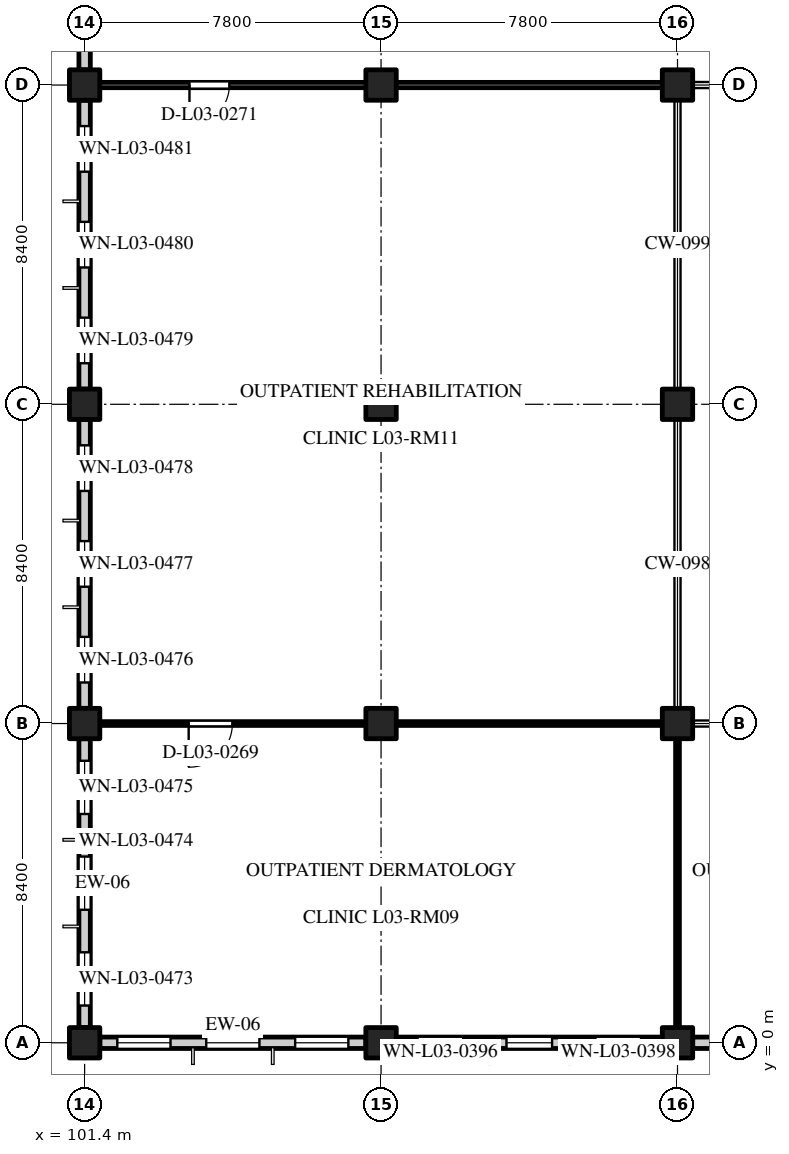
"""IFC4 building model, lengths in metres.
Left out: names, types, materials, properties, quantities, classifications, styles, units other than length and angle.
Written with IfcOpenShell. Run it as: python <this file> out.ifc"""

import sys

from ifc_helpers import new_model, si_unit, direction, frame, frame_2d, origin, origin_2d, place, context, subcontext, project, spatial, rectangle, extrude, element, fill, save


model = new_model("IFC4")
c1 = context("Model", 3, precision=1e-05, world=origin(), true_north=direction((0.0, 1.0)))
c2 = subcontext(c1, "Body", "Model", "MODEL_VIEW")
j1 = project(units=[si_unit("LENGTHUNIT", "METRE"), si_unit("PLANEANGLEUNIT", "RADIAN")], contexts=[c1])
p1 = place(None, origin())
s1 = spatial("IfcSite", under=j1, at=p1, CompositionType="ELEMENT")
p2 = place(p1, origin())
s2 = spatial("IfcBuilding", under=s1, at=p2, CompositionType="ELEMENT")
p3 = place(p2, frame((0.0, 0.0, 14.4)))
s3 = spatial("IfcBuildingStorey", under=s2, at=p3, CompositionType="ELEMENT", Elevation=14.4)
for number, where, z_axis, x_axis in (
    (1, (101.4, 0.0, 0.0), (0.0, 0.0, 1.0), (1.0, 0.0, 0.0)),
    (2, (101.4, 8.4, 0.0), (0.0, 0.0, 1.0), (1.0, 0.0, 0.0)),
    (3, (101.4, 16.8, 0.0), (0.0, 0.0, 1.0), (1.0, 0.0, 0.0)),
    (4, (101.4, 25.2, 0.0), (0.0, 0.0, 1.0), (1.0, 0.0, 0.0)),
    (5, (109.2, 0.0, 0.0), (0.0, 0.0, 1.0), (1.0, 0.0, 0.0)),
    (6, (109.2, 8.4, 0.0), (0.0, 0.0, 1.0), (1.0, 0.0, 0.0)),
    (7, (109.2, 16.8, 0.0), (0.0, 0.0, 1.0), (1.0, 0.0, 0.0)),
    (8, (109.2, 25.2, 0.0), (0.0, 0.0, 1.0), (1.0, 0.0, 0.0)),
    (9, (117.0, 0.0, 0.0), (0.0, 0.0, 1.0), (1.0, 0.0, 0.0)),
    (10, (117.0, 8.4, 0.0), (0.0, 0.0, 1.0), (1.0, 0.0, 0.0)),
    (11, (117.0, 16.8, 0.0), (0.0, 0.0, 1.0), (1.0, 0.0, 0.0)),
    (12, (117.0, 25.2, 0.0), (0.0, 0.0, 1.0), (1.0, 0.0, 0.0)),
):
    element("IfcColumn", number, at=place(p3, frame(where, z_axis=z_axis, x_axis=x_axis)), inside=s3, PredefinedType="COLUMN", context=c2, shape_type="SweptSolid", body=[
        extrude(rectangle(XDim=0.8, YDim=0.8, at=origin_2d()), origin(), (0.0, 0.0, 1.0), 3.6),
    ])
p4 = place(p3, frame((101.8, 0.0, 0.0), z_axis=(0.0, 0.0, 1.0), x_axis=(1.0, 0.0, 0.0)))
e13 = element("IfcWall", 13, at=p4, inside=s3, PredefinedType="STANDARD", context=c2, shape_type="SweptSolid", body=[
    extrude(rectangle(XDim=7.0, YDim=0.3, at=frame_2d((3.5, 0.0))), origin(), (0.0, 0.0, 1.0), 2.72),
])
p5 = place(p4, frame((0.46, 0.0, 0.8)))
e14 = element("IfcOpeningElement", 14, at=p5, cuts=e13, PredefinedType="OPENING", context=c2, shape_type="SweptSolid", body=[
    extrude(rectangle(XDim=1.4, YDim=1.45, at=frame_2d((0.7, 0.725))), frame((0.0, 0.162, 0.0), z_axis=(0.0, -1.0, 0.0), x_axis=(1.0, 0.0, 0.0)), (0.0, 0.0, 1.0), 0.324),
])
p6 = place(p4, frame((2.8, 0.0, 0.8)))
e15 = element("IfcOpeningElement", 15, at=p6, cuts=e13, PredefinedType="OPENING", context=c2, shape_type="SweptSolid", body=[
    extrude(rectangle(XDim=1.4, YDim=1.45, at=frame_2d((0.7, 0.725))), frame((0.0, 0.162, 0.0), z_axis=(0.0, -1.0, 0.0), x_axis=(1.0, 0.0, 0.0)), (0.0, 0.0, 1.0), 0.324),
])
p7 = place(p4, frame((5.14, 0.0, 0.8)))
e16 = element("IfcOpeningElement", 16, at=p7, cuts=e13, PredefinedType="OPENING", context=c2, shape_type="SweptSolid", body=[
    extrude(rectangle(XDim=1.4, YDim=1.45, at=frame_2d((0.7, 0.725))), frame((0.0, 0.162, 0.0), z_axis=(0.0, -1.0, 0.0), x_axis=(1.0, 0.0, 0.0)), (0.0, 0.0, 1.0), 0.324),
])
p8 = place(p3, frame((109.6, 0.0, 0.0), z_axis=(0.0, 0.0, 1.0), x_axis=(1.0, 0.0, 0.0)))
e17 = element("IfcWall", 17, at=p8, inside=s3, PredefinedType="STANDARD", context=c2, shape_type="SweptSolid", body=[
    extrude(rectangle(XDim=7.0, YDim=0.3, at=frame_2d((3.5, 0.0))), origin(), (0.0, 0.0, 1.0), 2.72),
])
p9 = place(p8, frame((0.56, 0.0, 0.8)))
e18 = element("IfcOpeningElement", 18, at=p9, cuts=e17, PredefinedType="OPENING", context=c2, shape_type="SweptSolid", body=[
    extrude(rectangle(XDim=1.2, YDim=1.55, at=frame_2d((0.6, 0.775))), frame((0.0, 0.162, 0.0), z_axis=(0.0, -1.0, 0.0), x_axis=(1.0, 0.0, 0.0)), (0.0, 0.0, 1.0), 0.324),
])
p10 = place(p8, frame((2.9, 0.0, 0.8)))
e19 = element("IfcOpeningElement", 19, at=p10, cuts=e17, PredefinedType="OPENING", context=c2, shape_type="SweptSolid", body=[
    extrude(rectangle(XDim=1.2, YDim=1.55, at=frame_2d((0.6, 0.775))), frame((0.0, 0.162, 0.0), z_axis=(0.0, -1.0, 0.0), x_axis=(1.0, 0.0, 0.0)), (0.0, 0.0, 1.0), 0.324),
])
p11 = place(p8, frame((5.24, 0.0, 0.8)))
e20 = element("IfcOpeningElement", 20, at=p11, cuts=e17, PredefinedType="OPENING", context=c2, shape_type="SweptSolid", body=[
    extrude(rectangle(XDim=1.2, YDim=1.55, at=frame_2d((0.6, 0.775))), frame((0.0, 0.162, 0.0), z_axis=(0.0, -1.0, 0.0), x_axis=(1.0, 0.0, 0.0)), (0.0, 0.0, 1.0), 0.324),
])
p12 = place(p3, frame((117.4, 0.0, 0.0), z_axis=(0.0, 0.0, 1.0), x_axis=(1.0, 0.0, 0.0)))
e21 = element("IfcWall", 21, at=p12, inside=s3, PredefinedType="STANDARD", context=c2, shape_type="SweptSolid", body=[
    extrude(rectangle(XDim=7.0, YDim=0.3, at=frame_2d((3.5, 0.0))), origin(), (0.0, 0.0, 1.0), 2.72),
])
p13 = place(p12, frame((0.56, 0.0, 0.8)))
e22 = element("IfcOpeningElement", 22, at=p13, cuts=e21, PredefinedType="OPENING", context=c2, shape_type="SweptSolid", body=[
    extrude(rectangle(XDim=1.2, YDim=1.4, at=frame_2d((0.6, 0.7))), frame((0.0, 0.162, 0.0), z_axis=(0.0, -1.0, 0.0), x_axis=(1.0, 0.0, 0.0)), (0.0, 0.0, 1.0), 0.324),
])
p14 = place(p12, frame((2.9, 0.0, 0.8)))
e23 = element("IfcOpeningElement", 23, at=p14, cuts=e21, PredefinedType="OPENING", context=c2, shape_type="SweptSolid", body=[
    extrude(rectangle(XDim=1.2, YDim=1.4, at=frame_2d((0.6, 0.7))), frame((0.0, 0.162, 0.0), z_axis=(0.0, -1.0, 0.0), x_axis=(1.0, 0.0, 0.0)), (0.0, 0.0, 1.0), 0.324),
])
p15 = place(p12, frame((5.24, 0.0, 0.8)))
e24 = element("IfcOpeningElement", 24, at=p15, cuts=e21, PredefinedType="OPENING", context=c2, shape_type="SweptSolid", body=[
    extrude(rectangle(XDim=1.2, YDim=1.4, at=frame_2d((0.6, 0.7))), frame((0.0, 0.162, 0.0), z_axis=(0.0, -1.0, 0.0), x_axis=(1.0, 0.0, 0.0)), (0.0, 0.0, 1.0), 0.324),
])
p16 = place(p3, frame((101.4, 0.4, 0.0), z_axis=(0.0, 0.0, 1.0), x_axis=(0.0, 1.0, 0.0)))
e25 = element("IfcWall", 25, at=p16, inside=s3, PredefinedType="STANDARD", context=c2, shape_type="SweptSolid", body=[
    extrude(rectangle(XDim=7.6, YDim=0.3, at=frame_2d((3.8, 0.0))), origin(), (0.0, 0.0, 1.0), 2.62),
])
p17 = place(p16, frame((0.58, 0.0, 0.8)))
e26 = element("IfcOpeningElement", 26, at=p17, cuts=e25, PredefinedType="OPENING", context=c2, shape_type="SweptSolid", body=[
    extrude(rectangle(XDim=1.4, YDim=1.45, at=frame_2d((0.7, 0.725))), frame((0.0, 0.162, 0.0), z_axis=(0.0, -1.0, 0.0), x_axis=(1.0, 0.0, 0.0)), (0.0, 0.0, 1.0), 0.324),
])
p18 = place(p16, frame((3.1, 0.0, 0.8)))
e27 = element("IfcOpeningElement", 27, at=p18, cuts=e25, PredefinedType="OPENING", context=c2, shape_type="SweptSolid", body=[
    extrude(rectangle(XDim=1.4, YDim=1.45, at=frame_2d((0.7, 0.725))), frame((0.0, 0.162, 0.0), z_axis=(0.0, -1.0, 0.0), x_axis=(1.0, 0.0, 0.0)), (0.0, 0.0, 1.0), 0.324),
])
p19 = place(p16, frame((5.62, 0.0, 0.8)))
e28 = element("IfcOpeningElement", 28, at=p19, cuts=e25, PredefinedType="OPENING", context=c2, shape_type="SweptSolid", body=[
    extrude(rectangle(XDim=1.4, YDim=1.45, at=frame_2d((0.7, 0.725))), frame((0.0, 0.162, 0.0), z_axis=(0.0, -1.0, 0.0), x_axis=(1.0, 0.0, 0.0)), (0.0, 0.0, 1.0), 0.324),
])
p20 = place(p3, frame((101.4, 8.8, 0.0), z_axis=(0.0, 0.0, 1.0), x_axis=(0.0, 1.0, 0.0)))
e29 = element("IfcWall", 29, at=p20, inside=s3, PredefinedType="STANDARD", context=c2, shape_type="SweptSolid", body=[
    extrude(rectangle(XDim=7.6, YDim=0.3, at=frame_2d((3.8, 0.0))), origin(), (0.0, 0.0, 1.0), 2.62),
])
p21 = place(p20, frame((0.68, 0.0, 0.8)))
e30 = element("IfcOpeningElement", 30, at=p21, cuts=e29, PredefinedType="OPENING", context=c2, shape_type="SweptSolid", body=[
    extrude(rectangle(XDim=1.2, YDim=1.55, at=frame_2d((0.6, 0.775))), frame((0.0, 0.162, 0.0), z_axis=(0.0, -1.0, 0.0), x_axis=(1.0, 0.0, 0.0)), (0.0, 0.0, 1.0), 0.324),
])
p22 = place(p20, frame((3.2, 0.0, 0.8)))
e31 = element("IfcOpeningElement", 31, at=p22, cuts=e29, PredefinedType="OPENING", context=c2, shape_type="SweptSolid", body=[
    extrude(rectangle(XDim=1.2, YDim=1.55, at=frame_2d((0.6, 0.775))), frame((0.0, 0.162, 0.0), z_axis=(0.0, -1.0, 0.0), x_axis=(1.0, 0.0, 0.0)), (0.0, 0.0, 1.0), 0.324),
])
p23 = place(p20, frame((5.72, 0.0, 0.8)))
e32 = element("IfcOpeningElement", 32, at=p23, cuts=e29, PredefinedType="OPENING", context=c2, shape_type="SweptSolid", body=[
    extrude(rectangle(XDim=1.2, YDim=1.55, at=frame_2d((0.6, 0.775))), frame((0.0, 0.162, 0.0), z_axis=(0.0, -1.0, 0.0), x_axis=(1.0, 0.0, 0.0)), (0.0, 0.0, 1.0), 0.324),
])
p24 = place(p3, frame((101.4, 17.2, 0.0), z_axis=(0.0, 0.0, 1.0), x_axis=(0.0, 1.0, 0.0)))
e33 = element("IfcWall", 33, at=p24, inside=s3, PredefinedType="STANDARD", context=c2, shape_type="SweptSolid", body=[
    extrude(rectangle(XDim=7.6, YDim=0.3, at=frame_2d((3.8, 0.0))), origin(), (0.0, 0.0, 1.0), 2.62),
])
p25 = place(p24, frame((0.68, 0.0, 0.8)))
e34 = element("IfcOpeningElement", 34, at=p25, cuts=e33, PredefinedType="OPENING", context=c2, shape_type="SweptSolid", body=[
    extrude(rectangle(XDim=1.2, YDim=1.4, at=frame_2d((0.6, 0.7))), frame((0.0, 0.162, 0.0), z_axis=(0.0, -1.0, 0.0), x_axis=(1.0, 0.0, 0.0)), (0.0, 0.0, 1.0), 0.324),
])
p26 = place(p24, frame((3.2, 0.0, 0.8)))
e35 = element("IfcOpeningElement", 35, at=p26, cuts=e33, PredefinedType="OPENING", context=c2, shape_type="SweptSolid", body=[
    extrude(rectangle(XDim=1.2, YDim=1.4, at=frame_2d((0.6, 0.7))), frame((0.0, 0.162, 0.0), z_axis=(0.0, -1.0, 0.0), x_axis=(1.0, 0.0, 0.0)), (0.0, 0.0, 1.0), 0.324),
])
p27 = place(p24, frame((5.72, 0.0, 0.8)))
e36 = element("IfcOpeningElement", 36, at=p27, cuts=e33, PredefinedType="OPENING", context=c2, shape_type="SweptSolid", body=[
    extrude(rectangle(XDim=1.2, YDim=1.4, at=frame_2d((0.6, 0.7))), frame((0.0, 0.162, 0.0), z_axis=(0.0, -1.0, 0.0), x_axis=(1.0, 0.0, 0.0)), (0.0, 0.0, 1.0), 0.324),
])
p28 = place(p3, frame((101.4, 25.6, 0.0), z_axis=(0.0, 0.0, 1.0), x_axis=(0.0, 1.0, 0.0)))
e37 = element("IfcWall", 37, at=p28, inside=s3, PredefinedType="STANDARD", context=c2, shape_type="SweptSolid", body=[
    extrude(rectangle(XDim=7.6, YDim=0.3, at=frame_2d((3.8, 0.0))), origin(), (0.0, 0.0, 1.0), 2.62),
])
p29 = place(p28, frame((0.58, 0.0, 0.8)))
e38 = element("IfcOpeningElement", 38, at=p29, cuts=e37, PredefinedType="OPENING", context=c2, shape_type="SweptSolid", body=[
    extrude(rectangle(XDim=1.4, YDim=1.6, at=frame_2d((0.7, 0.8))), frame((0.0, 0.162, 0.0), z_axis=(0.0, -1.0, 0.0), x_axis=(1.0, 0.0, 0.0)), (0.0, 0.0, 1.0), 0.324),
])
p30 = place(p28, frame((3.1, 0.0, 0.8)))
e39 = element("IfcOpeningElement", 39, at=p30, cuts=e37, PredefinedType="OPENING", context=c2, shape_type="SweptSolid", body=[
    extrude(rectangle(XDim=1.4, YDim=1.6, at=frame_2d((0.7, 0.8))), frame((0.0, 0.162, 0.0), z_axis=(0.0, -1.0, 0.0), x_axis=(1.0, 0.0, 0.0)), (0.0, 0.0, 1.0), 0.324),
])
p31 = place(p28, frame((5.62, 0.0, 0.8)))
e40 = element("IfcOpeningElement", 40, at=p31, cuts=e37, PredefinedType="OPENING", context=c2, shape_type="SweptSolid", body=[
    extrude(rectangle(XDim=1.4, YDim=1.6, at=frame_2d((0.7, 0.8))), frame((0.0, 0.162, 0.0), z_axis=(0.0, -1.0, 0.0), x_axis=(1.0, 0.0, 0.0)), (0.0, 0.0, 1.0), 0.324),
])
p32 = place(p3, frame((101.485, 8.4, 0.0), z_axis=(0.0, 0.0, 1.0), x_axis=(1.0, 0.0, 0.0)))
e41 = element("IfcWall", 41, at=p32, inside=s3, PredefinedType="PARTITIONING", context=c2, shape_type="SweptSolid", body=[
    extrude(rectangle(XDim=15.43, YDim=0.1, at=frame_2d((7.715, 0.0))), origin(), (0.0, 0.0, 1.0), 3.25),
])
p33 = place(p32, frame((2.653, 0.0, 0.0)))
e42 = element("IfcOpeningElement", 42, at=p33, cuts=e41, PredefinedType="OPENING", context=c2, shape_type="SweptSolid", body=[
    extrude(rectangle(XDim=1.15, YDim=2.15, at=frame_2d((0.575, 1.075))), frame((0.0, 0.062, 0.0), z_axis=(0.0, -1.0, 0.0), x_axis=(1.0, 0.0, 0.0)), (0.0, 0.0, 1.0), 0.124),
])
p34 = place(p3, frame((108.84, 0.0, 0.0), z_axis=(0.0, 0.0, 1.0), x_axis=(1.0, 0.0, 0.0)))
e43 = element("IfcWall", 43, at=p34, inside=s3, PredefinedType="PARTITIONING", context=c2, shape_type="SweptSolid", body=[
    extrude(rectangle(XDim=0.72, YDim=0.1, at=frame_2d((0.36, 0.0))), origin(), (0.0, 0.0, 1.0), 2.62),
])
p35 = place(p3, frame((117.0, 0.085, 0.0), z_axis=(0.0, 0.0, 1.0), x_axis=(0.0, 1.0, 0.0)))
e44 = element("IfcWall", 44, at=p35, inside=s3, PredefinedType="PARTITIONING", context=c2, shape_type="SweptSolid", body=[
    extrude(rectangle(XDim=8.23, YDim=0.1, at=frame_2d((4.115, 0.0))), origin(), (0.0, 0.0, 1.0), 2.62),
])
p36 = place(p3, frame((101.485, 25.2, 0.0), z_axis=(0.0, 0.0, 1.0), x_axis=(1.0, 0.0, 0.0)))
e45 = element("IfcWall", 45, at=p36, inside=s3, PredefinedType="PARTITIONING", context=c2, shape_type="SweptSolid", body=[
    extrude(rectangle(XDim=15.43, YDim=0.14, at=frame_2d((7.715, 0.0))), origin(), (0.0, 0.0, 1.0), 2.62),
])
p37 = place(p36, frame((2.674, 0.0, 0.0)))
e46 = element("IfcOpeningElement", 46, at=p37, cuts=e45, PredefinedType="OPENING", context=c2, shape_type="SweptSolid", body=[
    extrude(rectangle(XDim=1.05, YDim=2.1, at=frame_2d((0.525, 1.05))), frame((0.0, 0.082, 0.0), z_axis=(0.0, -1.0, 0.0), x_axis=(1.0, 0.0, 0.0)), (0.0, 0.0, 1.0), 0.164),
])
for number, where, z_axis, x_axis in (
    (47, (101.4, 16.44, 0.0), (0.0, 0.0, 1.0), (0.0, 1.0, 0.0)),
    (48, (117.0, 16.44, 0.0), (0.0, 0.0, 1.0), (0.0, 1.0, 0.0)),
):
    element("IfcWall", number, at=place(p3, frame(where, z_axis=z_axis, x_axis=x_axis)), inside=s3, PredefinedType="PARTITIONING", context=c2, shape_type="SweptSolid", body=[
        extrude(rectangle(XDim=0.72, YDim=0.14, at=frame_2d((0.36, 0.0))), origin(), (0.0, 0.0, 1.0), 2.62),
    ])
p38 = place(p3, frame((116.955, 25.4, 0.0), z_axis=(0.0, 0.0, 1.0), x_axis=(1.0, 0.0, 0.0)))
e49 = element("IfcWall", 49, at=p38, inside=s3, PredefinedType="PARTITIONING", context=c2, shape_type="SweptSolid", body=[
    extrude(rectangle(XDim=0.405, YDim=0.14, at=frame_2d((0.203, 0.0))), origin(), (0.0, 0.0, 1.0), 2.62),
])
p39 = place(p5, origin())
e50 = element("IfcWindow", 50, at=p39, inside=s3, PartitioningType="SINGLE_PANEL", PredefinedType="WINDOW", context=c2, shape_type="SweptSolid", body=[
    extrude(rectangle(XDim=1.4, YDim=1.45, at=frame_2d((0.7, 0.725))), frame((0.0, 0.03, 0.0), z_axis=(0.0, -1.0, 0.0), x_axis=(1.0, 0.0, 0.0)), (0.0, 0.0, 1.0), 0.06),
])
fill(e14, e50)
p40 = place(p6, origin())
e51 = element("IfcWindow", 51, at=p40, inside=s3, PartitioningType="SINGLE_PANEL", PredefinedType="WINDOW", context=c2, shape_type="SweptSolid", body=[
    extrude(rectangle(XDim=1.4, YDim=1.45, at=frame_2d((0.7, 0.725))), frame((0.0, 0.03, 0.0), z_axis=(0.0, -1.0, 0.0), x_axis=(1.0, 0.0, 0.0)), (0.0, 0.0, 1.0), 0.06),
])
fill(e15, e51)
p41 = place(p7, origin())
e52 = element("IfcWindow", 52, at=p41, inside=s3, PartitioningType="SINGLE_PANEL", PredefinedType="WINDOW", context=c2, shape_type="SweptSolid", body=[
    extrude(rectangle(XDim=1.4, YDim=1.45, at=frame_2d((0.7, 0.725))), frame((0.0, 0.03, 0.0), z_axis=(0.0, -1.0, 0.0), x_axis=(1.0, 0.0, 0.0)), (0.0, 0.0, 1.0), 0.06),
])
fill(e16, e52)
p42 = place(p9, origin())
e53 = element("IfcWindow", 53, at=p42, inside=s3, PartitioningType="SINGLE_PANEL", PredefinedType="WINDOW", context=c2, shape_type="SweptSolid", body=[
    extrude(rectangle(XDim=1.2, YDim=1.55, at=frame_2d((0.6, 0.775))), frame((0.0, 0.03, 0.0), z_axis=(0.0, -1.0, 0.0), x_axis=(1.0, 0.0, 0.0)), (0.0, 0.0, 1.0), 0.06),
])
fill(e18, e53)
p43 = place(p10, origin())
e54 = element("IfcWindow", 54, at=p43, inside=s3, PartitioningType="SINGLE_PANEL", PredefinedType="WINDOW", context=c2, shape_type="SweptSolid", body=[
    extrude(rectangle(XDim=1.2, YDim=1.55, at=frame_2d((0.6, 0.775))), frame((0.0, 0.03, 0.0), z_axis=(0.0, -1.0, 0.0), x_axis=(1.0, 0.0, 0.0)), (0.0, 0.0, 1.0), 0.06),
])
fill(e19, e54)
p44 = place(p11, origin())
e55 = element("IfcWindow", 55, at=p44, inside=s3, PartitioningType="SINGLE_PANEL", PredefinedType="WINDOW", context=c2, shape_type="SweptSolid", body=[
    extrude(rectangle(XDim=1.2, YDim=1.55, at=frame_2d((0.6, 0.775))), frame((0.0, 0.03, 0.0), z_axis=(0.0, -1.0, 0.0), x_axis=(1.0, 0.0, 0.0)), (0.0, 0.0, 1.0), 0.06),
])
fill(e20, e55)
p45 = place(p17, origin())
e56 = element("IfcWindow", 56, at=p45, inside=s3, PartitioningType="SINGLE_PANEL", PredefinedType="WINDOW", context=c2, shape_type="SweptSolid", body=[
    extrude(rectangle(XDim=1.4, YDim=1.45, at=frame_2d((0.7, 0.725))), frame((0.0, 0.03, 0.0), z_axis=(0.0, -1.0, 0.0), x_axis=(1.0, 0.0, 0.0)), (0.0, 0.0, 1.0), 0.06),
])
fill(e26, e56)
p46 = place(p18, origin())
e57 = element("IfcWindow", 57, at=p46, inside=s3, PartitioningType="SINGLE_PANEL", PredefinedType="WINDOW", context=c2, shape_type="SweptSolid", body=[
    extrude(rectangle(XDim=1.4, YDim=1.45, at=frame_2d((0.7, 0.725))), frame((0.0, 0.03, 0.0), z_axis=(0.0, -1.0, 0.0), x_axis=(1.0, 0.0, 0.0)), (0.0, 0.0, 1.0), 0.06),
])
fill(e27, e57)
p47 = place(p19, origin())
e58 = element("IfcWindow", 58, at=p47, inside=s3, PartitioningType="SINGLE_PANEL", PredefinedType="WINDOW", context=c2, shape_type="SweptSolid", body=[
    extrude(rectangle(XDim=1.4, YDim=1.45, at=frame_2d((0.7, 0.725))), frame((0.0, 0.03, 0.0), z_axis=(0.0, -1.0, 0.0), x_axis=(1.0, 0.0, 0.0)), (0.0, 0.0, 1.0), 0.06),
])
fill(e28, e58)
p48 = place(p21, origin())
e59 = element("IfcWindow", 59, at=p48, inside=s3, PartitioningType="SINGLE_PANEL", PredefinedType="WINDOW", context=c2, shape_type="SweptSolid", body=[
    extrude(rectangle(XDim=1.2, YDim=1.55, at=frame_2d((0.6, 0.775))), frame((0.0, 0.03, 0.0), z_axis=(0.0, -1.0, 0.0), x_axis=(1.0, 0.0, 0.0)), (0.0, 0.0, 1.0), 0.06),
])
fill(e30, e59)
p49 = place(p22, origin())
e60 = element("IfcWindow", 60, at=p49, inside=s3, PartitioningType="SINGLE_PANEL", PredefinedType="WINDOW", context=c2, shape_type="SweptSolid", body=[
    extrude(rectangle(XDim=1.2, YDim=1.55, at=frame_2d((0.6, 0.775))), frame((0.0, 0.03, 0.0), z_axis=(0.0, -1.0, 0.0), x_axis=(1.0, 0.0, 0.0)), (0.0, 0.0, 1.0), 0.06),
])
fill(e31, e60)
p50 = place(p23, origin())
e61 = element("IfcWindow", 61, at=p50, inside=s3, PartitioningType="SINGLE_PANEL", PredefinedType="WINDOW", context=c2, shape_type="SweptSolid", body=[
    extrude(rectangle(XDim=1.2, YDim=1.55, at=frame_2d((0.6, 0.775))), frame((0.0, 0.03, 0.0), z_axis=(0.0, -1.0, 0.0), x_axis=(1.0, 0.0, 0.0)), (0.0, 0.0, 1.0), 0.06),
])
fill(e32, e61)
p51 = place(p25, origin())
e62 = element("IfcWindow", 62, at=p51, inside=s3, PartitioningType="SINGLE_PANEL", PredefinedType="WINDOW", context=c2, shape_type="SweptSolid", body=[
    extrude(rectangle(XDim=1.2, YDim=1.4, at=frame_2d((0.6, 0.7))), frame((0.0, 0.03, 0.0), z_axis=(0.0, -1.0, 0.0), x_axis=(1.0, 0.0, 0.0)), (0.0, 0.0, 1.0), 0.06),
])
fill(e34, e62)
p52 = place(p26, origin())
e63 = element("IfcWindow", 63, at=p52, inside=s3, PartitioningType="SINGLE_PANEL", PredefinedType="WINDOW", context=c2, shape_type="SweptSolid", body=[
    extrude(rectangle(XDim=1.2, YDim=1.4, at=frame_2d((0.6, 0.7))), frame((0.0, 0.03, 0.0), z_axis=(0.0, -1.0, 0.0), x_axis=(1.0, 0.0, 0.0)), (0.0, 0.0, 1.0), 0.06),
])
fill(e35, e63)
p53 = place(p27, origin())
e64 = element("IfcWindow", 64, at=p53, inside=s3, PartitioningType="SINGLE_PANEL", PredefinedType="WINDOW", context=c2, shape_type="SweptSolid", body=[
    extrude(rectangle(XDim=1.2, YDim=1.4, at=frame_2d((0.6, 0.7))), frame((0.0, 0.03, 0.0), z_axis=(0.0, -1.0, 0.0), x_axis=(1.0, 0.0, 0.0)), (0.0, 0.0, 1.0), 0.06),
])
fill(e36, e64)
p54 = place(p33, frame((1.15, 0.0, 0.0), z_axis=(0.0, 0.0, 1.0), x_axis=(-1.0, 0.0, 0.0)))
e65 = element("IfcDoor", 65, at=p54, inside=s3, OperationType="SINGLE_SWING_RIGHT", PredefinedType="DOOR", context=c2, shape_type="SweptSolid", body=[
    extrude(rectangle(XDim=1.15, YDim=2.15, at=frame_2d((0.575, 1.075))), frame((0.0, 0.025, 0.0), z_axis=(0.0, -1.0, 0.0), x_axis=(1.0, 0.0, 0.0)), (0.0, 0.0, 1.0), 0.05),
])
fill(e42, e65)
p55 = place(p37, frame((1.05, 0.0, 0.0), z_axis=(0.0, 0.0, 1.0), x_axis=(-1.0, 0.0, 0.0)))
e66 = element("IfcDoor", 66, at=p55, inside=s3, OperationType="SINGLE_SWING_RIGHT", PredefinedType="DOOR", context=c2, shape_type="SweptSolid", body=[
    extrude(rectangle(XDim=1.05, YDim=2.1, at=frame_2d((0.525, 1.05))), frame((0.0, 0.025, 0.0), z_axis=(0.0, -1.0, 0.0), x_axis=(1.0, 0.0, 0.0)), (0.0, 0.0, 1.0), 0.05),
])
fill(e46, e66)
save(model, sys.argv[1])
